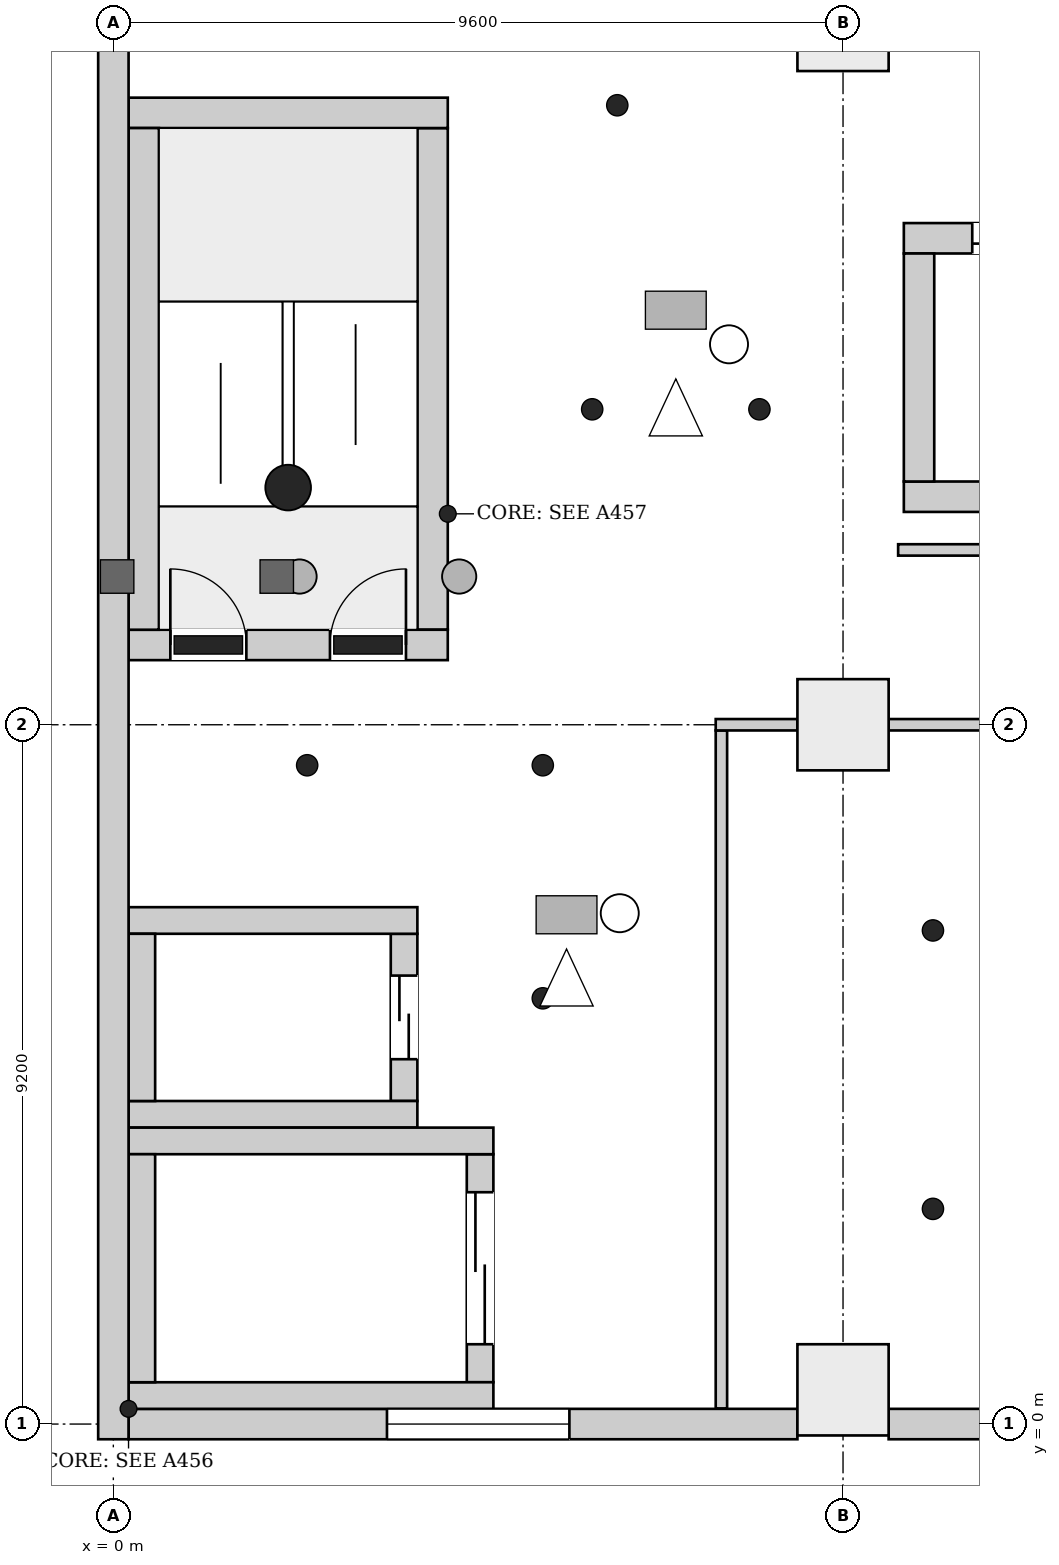
"""IFC4 building model, lengths in metres.
Left out: names, types, materials, properties, quantities, classifications, styles, units other than length and angle.
Written with IfcOpenShell. Run it as: python <this file> out.ifc"""

import sys

from ifc_helpers import new_model, si_unit, direction, frame, frame_2d, origin, origin_2d, place, context, subcontext, project, spatial, rectangle, extrude, element, fill, save


model = new_model("IFC4")
c1 = context("Model", 3, precision=1e-05, world=origin(), true_north=direction((0.0, 1.0)))
c2 = subcontext(c1, "Body", "Model", "MODEL_VIEW")
j1 = project(units=[si_unit("LENGTHUNIT", "METRE"), si_unit("PLANEANGLEUNIT", "RADIAN")], contexts=[c1])
p1 = place(None, origin())
s1 = spatial("IfcSite", under=j1, at=p1, CompositionType="ELEMENT")
p2 = place(p1, origin())
s2 = spatial("IfcBuilding", under=s1, at=p2, CompositionType="ELEMENT")
p3 = place(p2, frame((0.0, 0.0, 21.7)))
s3 = spatial("IfcBuildingStorey", under=s2, at=p3, CompositionType="ELEMENT", Elevation=21.7)
p4 = place(p3, frame((0.0, -0.2, 0.0), z_axis=(0.0, 0.0, 1.0), x_axis=(0.0, 1.0, 0.0)))
e1 = element("IfcWall", 1, at=p4, inside=s3, PredefinedType="SHEAR", context=c2, shape_type="SweptSolid", body=[
    extrude(rectangle(XDim=46.88, YDim=0.4, at=frame_2d((23.44, 0.0))), origin(), (0.0, 0.0, 1.0), 5.0),
])
p5 = place(p3, frame((0.2, 10.25, 0.0), z_axis=(0.0, 0.0, 1.0), x_axis=(1.0, 0.0, 0.0)))
e2 = element("IfcWall", 2, at=p5, inside=s3, PredefinedType="SHEAR", context=c2, shape_type="SweptSolid", body=[
    extrude(rectangle(XDim=4.2, YDim=0.4, at=frame_2d((2.1, 0.0))), origin(), (0.0, 0.0, 1.0), 5.0),
])
p6 = place(p5, frame((0.55, 0.0, 0.0)))
e3 = element("IfcOpeningElement", 3, at=p6, cuts=e2, PredefinedType="OPENING", context=c2, shape_type="SweptSolid", body=[
    extrude(rectangle(XDim=1.0, YDim=2.1, at=frame_2d((0.5, 1.05))), frame((0.0, 0.21, 0.0), z_axis=(0.0, -1.0, 0.0), x_axis=(1.0, 0.0, 0.0)), (0.0, 0.0, 1.0), 0.42),
])
p7 = place(p5, frame((2.65, 0.0, 0.0)))
e4 = element("IfcOpeningElement", 4, at=p7, cuts=e2, PredefinedType="OPENING", context=c2, shape_type="SweptSolid", body=[
    extrude(rectangle(XDim=1.0, YDim=2.1, at=frame_2d((0.5, 1.05))), frame((0.0, 0.21, 0.0), z_axis=(0.0, -1.0, 0.0), x_axis=(1.0, 0.0, 0.0)), (0.0, 0.0, 1.0), 0.42),
])
p8 = place(p3, frame((0.2, 17.25, 0.0), z_axis=(0.0, 0.0, 1.0), x_axis=(1.0, 0.0, 0.0)))
e5 = element("IfcWall", 5, at=p8, inside=s3, PredefinedType="SHEAR", context=c2, shape_type="SweptSolid", body=[
    extrude(rectangle(XDim=4.2, YDim=0.4, at=frame_2d((2.1, 0.0))), origin(), (0.0, 0.0, 1.0), 5.0),
])
for number, where, z_axis, x_axis in (
    (6, (0.4, 10.45, 0.0), (0.0, 0.0, 1.0), (0.0, 1.0, 0.0)),
    (7, (4.2, 10.45, 0.0), (0.0, 0.0, 1.0), (0.0, 1.0, 0.0)),
):
    element("IfcWall", number, at=place(p3, frame(where, z_axis=z_axis, x_axis=x_axis)), inside=s3, PredefinedType="SHEAR", context=c2, shape_type="SweptSolid", body=[
        extrude(rectangle(XDim=6.6, YDim=0.4, at=frame_2d((3.3, 0.0))), origin(), (0.0, 0.0, 1.0), 5.0),
    ])
for number, where, z_axis, x_axis in (
    (8, (0.2, 0.375, 0.0), (0.0, 0.0, 1.0), (1.0, 0.0, 0.0)),
    (9, (0.2, 3.725, 0.0), (0.0, 0.0, 1.0), (1.0, 0.0, 0.0)),
):
    element("IfcWall", number, at=place(p3, frame(where, z_axis=z_axis, x_axis=x_axis)), inside=s3, PredefinedType="SHEAR", context=c2, shape_type="SweptSolid", body=[
        extrude(rectangle(XDim=4.8, YDim=0.35, at=frame_2d((2.4, 0.0))), origin(), (0.0, 0.0, 1.0), 5.0),
    ])
p9 = place(p3, frame((0.375, 0.55, 0.0), z_axis=(0.0, 0.0, 1.0), x_axis=(0.0, 1.0, 0.0)))
e10 = element("IfcWall", 10, at=p9, inside=s3, PredefinedType="SHEAR", context=c2, shape_type="SweptSolid", body=[
    extrude(rectangle(XDim=3.0, YDim=0.35, at=frame_2d((1.5, 0.0))), origin(), (0.0, 0.0, 1.0), 5.0),
])
p10 = place(p3, frame((4.825, 0.55, 0.0), z_axis=(0.0, 0.0, 1.0), x_axis=(0.0, 1.0, 0.0)))
e11 = element("IfcWall", 11, at=p10, inside=s3, PredefinedType="SHEAR", context=c2, shape_type="SweptSolid", body=[
    extrude(rectangle(XDim=3.0, YDim=0.35, at=frame_2d((1.5, 0.0))), origin(), (0.0, 0.0, 1.0), 5.0),
])
p11 = place(p10, frame((0.5, 0.0, 0.0)))
e12 = element("IfcOpeningElement", 12, at=p11, cuts=e11, PredefinedType="OPENING", context=c2, shape_type="SweptSolid", body=[
    extrude(rectangle(XDim=2.0, YDim=2.4, at=frame_2d((1.0, 1.2))), frame((0.0, 0.185, 0.0), z_axis=(0.0, -1.0, 0.0), x_axis=(1.0, 0.0, 0.0)), (0.0, 0.0, 1.0), 0.37),
])
for number, where, z_axis, x_axis in (
    (13, (0.2, 4.075, 0.0), (0.0, 0.0, 1.0), (1.0, 0.0, 0.0)),
    (14, (0.2, 6.625, 0.0), (0.0, 0.0, 1.0), (1.0, 0.0, 0.0)),
):
    element("IfcWall", number, at=place(p3, frame(where, z_axis=z_axis, x_axis=x_axis)), inside=s3, PredefinedType="SHEAR", context=c2, shape_type="SweptSolid", body=[
        extrude(rectangle(XDim=3.8, YDim=0.35, at=frame_2d((1.9, 0.0))), origin(), (0.0, 0.0, 1.0), 5.0),
    ])
p12 = place(p3, frame((0.375, 4.25, 0.0), z_axis=(0.0, 0.0, 1.0), x_axis=(0.0, 1.0, 0.0)))
e15 = element("IfcWall", 15, at=p12, inside=s3, PredefinedType="SHEAR", context=c2, shape_type="SweptSolid", body=[
    extrude(rectangle(XDim=2.2, YDim=0.35, at=frame_2d((1.1, 0.0))), origin(), (0.0, 0.0, 1.0), 5.0),
])
p13 = place(p3, frame((3.825, 4.25, 0.0), z_axis=(0.0, 0.0, 1.0), x_axis=(0.0, 1.0, 0.0)))
e16 = element("IfcWall", 16, at=p13, inside=s3, PredefinedType="SHEAR", context=c2, shape_type="SweptSolid", body=[
    extrude(rectangle(XDim=2.2, YDim=0.35, at=frame_2d((1.1, 0.0))), origin(), (0.0, 0.0, 1.0), 5.0),
])
p14 = place(p13, frame((0.55, 0.0, 0.0)))
e17 = element("IfcOpeningElement", 17, at=p14, cuts=e16, PredefinedType="OPENING", context=c2, shape_type="SweptSolid", body=[
    extrude(rectangle(XDim=1.1, YDim=2.1, at=frame_2d((0.55, 1.05))), frame((0.0, 0.185, 0.0), z_axis=(0.0, -1.0, 0.0), x_axis=(1.0, 0.0, 0.0)), (0.0, 0.0, 1.0), 0.37),
])
p15 = place(p3, frame((10.4, 12.2, 0.0), z_axis=(0.0, 0.0, 1.0), x_axis=(1.0, 0.0, 0.0)))
e18 = element("IfcWall", 18, at=p15, inside=s3, PredefinedType="SHEAR", context=c2, shape_type="SweptSolid", body=[
    extrude(rectangle(XDim=2.9, YDim=0.4, at=frame_2d((1.45, 0.0))), origin(), (0.0, 0.0, 1.0), 5.0),
])
p16 = place(p3, frame((10.4, 15.6, 0.0), z_axis=(0.0, 0.0, 1.0), x_axis=(1.0, 0.0, 0.0)))
e19 = element("IfcWall", 19, at=p16, inside=s3, PredefinedType="SHEAR", context=c2, shape_type="SweptSolid", body=[
    extrude(rectangle(XDim=2.9, YDim=0.4, at=frame_2d((1.45, 0.0))), origin(), (0.0, 0.0, 1.0), 5.0),
])
p17 = place(p16, frame((0.9, 0.0, 0.0)))
e20 = element("IfcOpeningElement", 20, at=p17, cuts=e19, PredefinedType="OPENING", context=c2, shape_type="SweptSolid", body=[
    extrude(rectangle(XDim=1.1, YDim=2.1, at=frame_2d((0.55, 1.05))), frame((0.0, 0.21, 0.0), z_axis=(0.0, -1.0, 0.0), x_axis=(1.0, 0.0, 0.0)), (0.0, 0.0, 1.0), 0.42),
])
p18 = place(p3, frame((10.6, 12.4, 0.0), z_axis=(0.0, 0.0, 1.0), x_axis=(0.0, 1.0, 0.0)))
e21 = element("IfcWall", 21, at=p18, inside=s3, PredefinedType="SHEAR", context=c2, shape_type="SweptSolid", body=[
    extrude(rectangle(XDim=3.0, YDim=0.4, at=frame_2d((1.5, 0.0))), origin(), (0.0, 0.0, 1.0), 5.0),
])
for number, where, z_axis, x_axis in (
    (22, (9.6, 0.45, 0.0), (0.0, 0.0, 1.0), (1.0, 0.0, 0.0)),
    (23, (9.6, 9.2, 0.0), (0.0, 0.0, 1.0), (1.0, 0.0, 0.0)),
    (24, (9.6, 18.4, 0.0), (0.0, 0.0, 1.0), (1.0, 0.0, 0.0)),
):
    element("IfcColumn", number, at=place(p3, frame(where, z_axis=z_axis, x_axis=x_axis)), inside=s3, PredefinedType="COLUMN", context=c2, shape_type="SweptSolid", body=[
        extrude(rectangle(XDim=1.2, YDim=1.2, at=origin_2d()), origin(), (0.0, 0.0, 1.0), 5.0),
    ])
p19 = place(p3, frame((0.2, 0.0, 0.0), z_axis=(0.0, 0.0, 1.0), x_axis=(1.0, 0.0, 0.0)))
e25 = element("IfcWall", 25, at=p19, inside=s3, PredefinedType="ELEMENTEDWALL", context=c2, shape_type="SweptSolid", body=[
    extrude(rectangle(XDim=8.8, YDim=0.4, at=frame_2d((4.4, 0.0))), origin(), (0.0, 0.0, 1.0), 4.65),
])
p20 = place(p19, frame((3.4, 0.0, 1.0)))
e26 = element("IfcOpeningElement", 26, at=p20, cuts=e25, PredefinedType="OPENING", context=c2, shape_type="SweptSolid", body=[
    extrude(rectangle(XDim=2.4, YDim=2.2, at=frame_2d((1.2, 1.1))), frame((0.0, 0.21, 0.0), z_axis=(0.0, -1.0, 0.0), x_axis=(1.0, 0.0, 0.0)), (0.0, 0.0, 1.0), 0.42),
])
p21 = place(p3, frame((10.2, 0.0, 0.0), z_axis=(0.0, 0.0, 1.0), x_axis=(1.0, 0.0, 0.0)))
e27 = element("IfcWall", 27, at=p21, inside=s3, PredefinedType="ELEMENTEDWALL", context=c2, shape_type="SweptSolid", body=[
    extrude(rectangle(XDim=8.4, YDim=0.4, at=frame_2d((4.2, 0.0))), origin(), (0.0, 0.0, 1.0), 4.65),
])
p22 = place(p21, frame((3.0, 0.0, 1.0)))
e28 = element("IfcOpeningElement", 28, at=p22, cuts=e27, PredefinedType="OPENING", context=c2, shape_type="SweptSolid", body=[
    extrude(rectangle(XDim=2.4, YDim=2.2, at=frame_2d((1.2, 1.1))), frame((0.0, 0.21, 0.0), z_axis=(0.0, -1.0, 0.0), x_axis=(1.0, 0.0, 0.0)), (0.0, 0.0, 1.0), 0.42),
])
p23 = place(p3, frame((8.0, 0.206, 0.0), z_axis=(0.0, 0.0, 1.0), x_axis=(0.0, 1.0, 0.0)))
e29 = element("IfcWall", 29, at=p23, inside=s3, PredefinedType="PARTITIONING", context=c2, shape_type="SweptSolid", body=[
    extrude(rectangle(XDim=8.919, YDim=0.15, at=frame_2d((4.459, 0.0))), origin(), (0.0, 0.0, 1.0), 4.65),
])
p24 = place(p3, frame((7.925, 9.2, 0.0), z_axis=(0.0, 0.0, 1.0), x_axis=(1.0, 0.0, 0.0)))
e30 = element("IfcWall", 30, at=p24, inside=s3, PredefinedType="PARTITIONING", context=c2, shape_type="SweptSolid", body=[
    extrude(rectangle(XDim=1.075, YDim=0.15, at=frame_2d((0.538, 0.0))), origin(), (0.0, 0.0, 1.0), 4.25),
])
p25 = place(p3, frame((10.2, 9.2, 0.0), z_axis=(0.0, 0.0, 1.0), x_axis=(1.0, 0.0, 0.0)))
e31 = element("IfcWall", 31, at=p25, inside=s3, PredefinedType="PARTITIONING", context=c2, shape_type="SweptSolid", body=[
    extrude(rectangle(XDim=8.4, YDim=0.15, at=frame_2d((4.2, 0.0))), origin(), (0.0, 0.0, 1.0), 4.25),
])
p26 = place(p25, frame((3.7, 0.0, 0.0)))
e32 = element("IfcOpeningElement", 32, at=p26, cuts=e31, PredefinedType="OPENING", context=c2, shape_type="SweptSolid", body=[
    extrude(rectangle(XDim=1.0, YDim=2.1, at=frame_2d((0.5, 1.05))), frame((0.0, 0.085, 0.0), z_axis=(0.0, -1.0, 0.0), x_axis=(1.0, 0.0, 0.0)), (0.0, 0.0, 1.0), 0.17),
])
p27 = place(p25, frame((1.6, 0.0, 0.0)))
e33 = element("IfcOpeningElement", 33, at=p27, cuts=e31, PredefinedType="OPENING", context=c2, shape_type="SweptSolid", body=[
    extrude(rectangle(XDim=1.8, YDim=2.1, at=frame_2d((0.9, 1.05))), frame((0.0, 0.085, 0.0), z_axis=(0.0, -1.0, 0.0), x_axis=(1.0, 0.0, 0.0)), (0.0, 0.0, 1.0), 0.17),
])
p28 = place(p3, frame((10.325, 11.5, 0.0), z_axis=(0.0, 0.0, 1.0), x_axis=(1.0, 0.0, 0.0)))
e34 = element("IfcWall", 34, at=p28, inside=s3, PredefinedType="PARTITIONING", context=c2, shape_type="SweptSolid", body=[
    extrude(rectangle(XDim=9.569, YDim=0.15, at=frame_2d((4.785, 0.0))), origin(), (0.0, 0.0, 1.0), 4.65),
])
p29 = place(p20, origin())
e35 = element("IfcWindow", 35, at=p29, inside=s3, PartitioningType="SINGLE_PANEL", PredefinedType="WINDOW", context=c2, shape_type="SweptSolid", body=[
    extrude(rectangle(XDim=2.4, YDim=2.2, at=frame_2d((1.2, 1.1))), frame((0.0, 0.03, 0.0), z_axis=(0.0, -1.0, 0.0), x_axis=(1.0, 0.0, 0.0)), (0.0, 0.0, 1.0), 0.06),
])
fill(e26, e35)
p30 = place(p6, origin())
e36 = element("IfcDoor", 36, at=p30, inside=s3, OperationType="SINGLE_SWING_RIGHT", PredefinedType="DOOR", context=c2, shape_type="SweptSolid", body=[
    extrude(rectangle(XDim=1.0, YDim=2.1, at=frame_2d((0.5, 1.05))), frame((0.0, 0.025, 0.0), z_axis=(0.0, -1.0, 0.0), x_axis=(1.0, 0.0, 0.0)), (0.0, 0.0, 1.0), 0.05),
])
fill(e3, e36)
p31 = place(p7, origin())
e37 = element("IfcDoor", 37, at=p31, inside=s3, OperationType="SINGLE_SWING_LEFT", PredefinedType="DOOR", context=c2, shape_type="SweptSolid", body=[
    extrude(rectangle(XDim=1.0, YDim=2.1, at=frame_2d((0.5, 1.05))), frame((0.0, 0.025, 0.0), z_axis=(0.0, -1.0, 0.0), x_axis=(1.0, 0.0, 0.0)), (0.0, 0.0, 1.0), 0.05),
])
fill(e4, e37)
p32 = place(p11, origin())
e38 = element("IfcDoor", 38, at=p32, inside=s3, OperationType="DOUBLE_DOOR_SLIDING", PredefinedType="DOOR", context=c2, shape_type="SweptSolid", body=[
    extrude(rectangle(XDim=2.0, YDim=2.4, at=frame_2d((1.0, 1.2))), frame((0.0, 0.025, 0.0), z_axis=(0.0, -1.0, 0.0), x_axis=(1.0, 0.0, 0.0)), (0.0, 0.0, 1.0), 0.05),
])
fill(e12, e38)
p33 = place(p14, origin())
e39 = element("IfcDoor", 39, at=p33, inside=s3, OperationType="DOUBLE_DOOR_SLIDING", PredefinedType="DOOR", context=c2, shape_type="SweptSolid", body=[
    extrude(rectangle(XDim=1.1, YDim=2.1, at=frame_2d((0.55, 1.05))), frame((0.0, 0.025, 0.0), z_axis=(0.0, -1.0, 0.0), x_axis=(1.0, 0.0, 0.0)), (0.0, 0.0, 1.0), 0.05),
])
fill(e17, e39)
p34 = place(p17, origin())
e40 = element("IfcDoor", 40, at=p34, inside=s3, OperationType="DOUBLE_DOOR_SLIDING", PredefinedType="DOOR", context=c2, shape_type="SweptSolid", body=[
    extrude(rectangle(XDim=1.1, YDim=2.1, at=frame_2d((0.55, 1.05))), frame((0.0, 0.025, 0.0), z_axis=(0.0, -1.0, 0.0), x_axis=(1.0, 0.0, 0.0)), (0.0, 0.0, 1.0), 0.05),
])
fill(e20, e40)
save(model, sys.argv[1])
